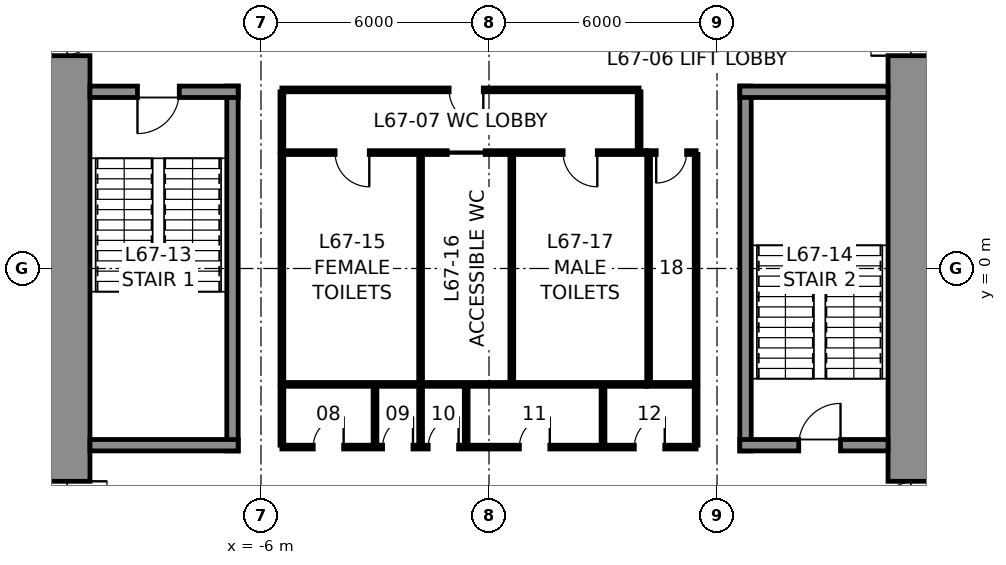
"""IFC4 building model, lengths in metres.
Left out: names, types, materials, properties, quantities, classifications, styles, units other than length and angle.
Written with IfcOpenShell. Run it as: python <this file> out.ifc"""

import sys

from ifc_helpers import new_model, si_unit, direction, frame, frame_2d, origin, place, context, subcontext, project, spatial, rectangle, extrude, element, fill, save


model = new_model("IFC4")
c1 = context("Model", 3, precision=1e-05, world=origin(), true_north=direction((0.0, 1.0)))
c2 = subcontext(c1, "Body", "Model", "MODEL_VIEW")
j1 = project(units=[si_unit("LENGTHUNIT", "METRE"), si_unit("PLANEANGLEUNIT", "RADIAN")], contexts=[c1])
p1 = place(None, origin())
s1 = spatial("IfcSite", under=j1, at=p1, CompositionType="ELEMENT")
p2 = place(p1, origin())
s2 = spatial("IfcBuilding", under=s1, at=p2, CompositionType="ELEMENT")
p3 = place(p2, frame((0.0, 0.0, 297.8)))
s3 = spatial("IfcBuildingStorey", under=s2, at=p3, CompositionType="ELEMENT", Elevation=297.8)
p4 = place(p3, frame((11.25, 10.5, 0.0), z_axis=(0.0, 0.0, 1.0), x_axis=(0.0, -1.0, 0.0)))
e1 = element("IfcWall", 1, at=p4, inside=s3, PredefinedType="SHEAR", context=c2, shape_type="SweptSolid", body=[
    extrude(rectangle(XDim=21.0, YDim=1.5, at=frame_2d((10.5, 0.0))), origin(), (0.0, 0.0, 1.0), 5.0),
])
p5 = place(p4, frame((3.7, 0.0, 0.0)))
e2 = element("IfcOpeningElement", 2, at=p5, cuts=e1, PredefinedType="OPENING", context=c2, shape_type="SweptSolid", body=[
    extrude(rectangle(XDim=1.2, YDim=2.3, at=frame_2d((0.6, 1.15))), frame((0.0, 0.76, 0.0), z_axis=(0.0, -1.0, 0.0), x_axis=(1.0, 0.0, 0.0)), (0.0, 0.0, 1.0), 1.52),
])
p6 = place(p4, frame((16.1, 0.0, 0.0)))
e3 = element("IfcOpeningElement", 3, at=p6, cuts=e1, PredefinedType="OPENING", context=c2, shape_type="SweptSolid", body=[
    extrude(rectangle(XDim=1.2, YDim=2.3, at=frame_2d((0.6, 1.15))), frame((0.0, 0.76, 0.0), z_axis=(0.0, -1.0, 0.0), x_axis=(1.0, 0.0, 0.0)), (0.0, 0.0, 1.0), 1.52),
])
p7 = place(p3, frame((-11.25, -10.5, 0.0), z_axis=(0.0, 0.0, 1.0), x_axis=(0.0, 1.0, 0.0)))
e4 = element("IfcWall", 4, at=p7, inside=s3, PredefinedType="SHEAR", context=c2, shape_type="SweptSolid", body=[
    extrude(rectangle(XDim=21.0, YDim=1.5, at=frame_2d((10.5, 0.0))), origin(), (0.0, 0.0, 1.0), 5.0),
])
p8 = place(p7, frame((16.1, 0.0, 0.0)))
e5 = element("IfcOpeningElement", 5, at=p8, cuts=e4, PredefinedType="OPENING", context=c2, shape_type="SweptSolid", body=[
    extrude(rectangle(XDim=1.2, YDim=2.3, at=frame_2d((0.6, 1.15))), frame((0.0, 0.76, 0.0), z_axis=(0.0, -1.0, 0.0), x_axis=(1.0, 0.0, 0.0)), (0.0, 0.0, 1.0), 1.52),
])
p9 = place(p7, frame((3.7, 0.0, 0.0)))
e6 = element("IfcOpeningElement", 6, at=p9, cuts=e4, PredefinedType="OPENING", context=c2, shape_type="SweptSolid", body=[
    extrude(rectangle(XDim=1.2, YDim=2.3, at=frame_2d((0.6, 1.15))), frame((0.0, 0.76, 0.0), z_axis=(0.0, -1.0, 0.0), x_axis=(1.0, 0.0, 0.0)), (0.0, 0.0, 1.0), 1.52),
])
p10 = place(p3, frame((-6.75, -4.8, 0.0), z_axis=(0.0, 0.0, 1.0), x_axis=(0.0, 1.0, 0.0)))
e7 = element("IfcWall", 7, at=p10, inside=s3, PredefinedType="SOLIDWALL", context=c2, shape_type="SweptSolid", body=[
    extrude(rectangle(XDim=9.6, YDim=0.3, at=frame_2d((4.8, 0.0))), origin(), (0.0, 0.0, 1.0), 4.75),
])
p11 = place(p3, frame((-10.5, 4.65, 0.0), z_axis=(0.0, 0.0, 1.0), x_axis=(1.0, 0.0, 0.0)))
e8 = element("IfcWall", 8, at=p11, inside=s3, PredefinedType="SOLIDWALL", context=c2, shape_type="SweptSolid", body=[
    extrude(rectangle(XDim=3.9, YDim=0.3, at=frame_2d((1.95, 0.0))), origin(), (0.0, 0.0, 1.0), 4.75),
])
p12 = place(p11, frame((1.25, 0.0, 0.0)))
e9 = element("IfcOpeningElement", 9, at=p12, cuts=e8, PredefinedType="OPENING", context=c2, shape_type="SweptSolid", body=[
    extrude(rectangle(XDim=1.1, YDim=2.3, at=frame_2d((0.55, 1.15))), frame((0.0, 0.16, 0.0), z_axis=(0.0, -1.0, 0.0), x_axis=(1.0, 0.0, 0.0)), (0.0, 0.0, 1.0), 0.32),
])
p13 = place(p3, frame((-6.6, -4.65, 0.0), z_axis=(0.0, 0.0, 1.0), x_axis=(-1.0, 0.0, 0.0)))
e10 = element("IfcWall", 10, at=p13, inside=s3, PredefinedType="SOLIDWALL", context=c2, shape_type="SweptSolid", body=[
    extrude(rectangle(XDim=3.9, YDim=0.3, at=frame_2d((1.95, 0.0))), origin(), (0.0, 0.0, 1.0), 4.75),
])
p14 = place(p3, frame((6.75, -4.8, 0.0), z_axis=(0.0, 0.0, 1.0), x_axis=(0.0, 1.0, 0.0)))
e11 = element("IfcWall", 11, at=p14, inside=s3, PredefinedType="SOLIDWALL", context=c2, shape_type="SweptSolid", body=[
    extrude(rectangle(XDim=9.6, YDim=0.3, at=frame_2d((4.8, 0.0))), origin(), (0.0, 0.0, 1.0), 4.75),
])
p15 = place(p3, frame((6.6, 4.65, 0.0), z_axis=(0.0, 0.0, 1.0), x_axis=(1.0, 0.0, 0.0)))
e12 = element("IfcWall", 12, at=p15, inside=s3, PredefinedType="SOLIDWALL", context=c2, shape_type="SweptSolid", body=[
    extrude(rectangle(XDim=3.9, YDim=0.3, at=frame_2d((1.95, 0.0))), origin(), (0.0, 0.0, 1.0), 4.75),
])
p16 = place(p3, frame((10.5, -4.65, 0.0), z_axis=(0.0, 0.0, 1.0), x_axis=(-1.0, 0.0, 0.0)))
e13 = element("IfcWall", 13, at=p16, inside=s3, PredefinedType="SOLIDWALL", context=c2, shape_type="SweptSolid", body=[
    extrude(rectangle(XDim=3.9, YDim=0.3, at=frame_2d((1.95, 0.0))), origin(), (0.0, 0.0, 1.0), 4.75),
])
p17 = place(p16, frame((1.25, 0.0, 0.0)))
e14 = element("IfcOpeningElement", 14, at=p17, cuts=e13, PredefinedType="OPENING", context=c2, shape_type="SweptSolid", body=[
    extrude(rectangle(XDim=1.1, YDim=2.3, at=frame_2d((0.55, 1.15))), frame((0.0, 0.16, 0.0), z_axis=(0.0, -1.0, 0.0), x_axis=(1.0, 0.0, 0.0)), (0.0, 0.0, 1.0), 0.32),
])
p18 = place(p3, frame((-5.45, 3.05, 0.0), z_axis=(0.0, 0.0, 1.0), x_axis=(1.0, 0.0, 0.0)))
e15 = element("IfcWall", 15, at=p18, inside=s3, PredefinedType="PARTITIONING", context=c2, shape_type="SweptSolid", body=[
    extrude(rectangle(XDim=9.6, YDim=0.1, at=frame_2d((4.8, 0.0))), origin(), (0.0, 0.0, 1.0), 4.75),
])
p19 = place(p18, frame((1.4, 0.0, 0.0)))
e16 = element("IfcOpeningElement", 16, at=p19, cuts=e15, PredefinedType="OPENING", context=c2, shape_type="SweptSolid", body=[
    extrude(rectangle(XDim=0.9, YDim=2.3, at=frame_2d((0.45, 1.15))), frame((0.0, 0.06, 0.0), z_axis=(0.0, -1.0, 0.0), x_axis=(1.0, 0.0, 0.0)), (0.0, 0.0, 1.0), 0.12),
])
p20 = place(p18, frame((4.35, 0.0, 0.0)))
e17 = element("IfcOpeningElement", 17, at=p20, cuts=e15, PredefinedType="OPENING", context=c2, shape_type="SweptSolid", body=[
    extrude(rectangle(XDim=1.0, YDim=2.3, at=frame_2d((0.5, 1.15))), frame((0.0, 0.06, 0.0), z_axis=(0.0, -1.0, 0.0), x_axis=(1.0, 0.0, 0.0)), (0.0, 0.0, 1.0), 0.12),
])
p21 = place(p18, frame((7.4, 0.0, 0.0)))
e18 = element("IfcOpeningElement", 18, at=p21, cuts=e15, PredefinedType="OPENING", context=c2, shape_type="SweptSolid", body=[
    extrude(rectangle(XDim=0.9, YDim=2.3, at=frame_2d((0.45, 1.15))), frame((0.0, 0.06, 0.0), z_axis=(0.0, -1.0, 0.0), x_axis=(1.0, 0.0, 0.0)), (0.0, 0.0, 1.0), 0.12),
])
p22 = place(p3, frame((4.15, 3.05, 0.0), z_axis=(0.0, 0.0, 1.0), x_axis=(1.0, 0.0, 0.0)))
e19 = element("IfcWall", 19, at=p22, inside=s3, PredefinedType="PARTITIONING", context=c2, shape_type="SweptSolid", body=[
    extrude(rectangle(XDim=1.3, YDim=0.1, at=frame_2d((0.65, 0.0))), origin(), (0.0, 0.0, 1.0), 4.75),
])
p23 = place(p22, frame((0.25, 0.0, 0.0)))
e20 = element("IfcOpeningElement", 20, at=p23, cuts=e19, PredefinedType="OPENING", context=c2, shape_type="SweptSolid", body=[
    extrude(rectangle(XDim=0.8, YDim=2.3, at=frame_2d((0.4, 1.15))), frame((0.0, 0.06, 0.0), z_axis=(0.0, -1.0, 0.0), x_axis=(1.0, 0.0, 0.0)), (0.0, 0.0, 1.0), 0.12),
])
p24 = place(p3, frame((4.15, -3.05, 0.0), z_axis=(0.0, 0.0, 1.0), x_axis=(-1.0, 0.0, 0.0)))
e21 = element("IfcWall", 21, at=p24, inside=s3, PredefinedType="PARTITIONING", context=c2, shape_type="SweptSolid", body=[
    extrude(rectangle(XDim=9.6, YDim=0.1, at=frame_2d((4.8, 0.0))), origin(), (0.0, 0.0, 1.0), 4.75),
])
p25 = place(p3, frame((5.45, -3.05, 0.0), z_axis=(0.0, 0.0, 1.0), x_axis=(-1.0, 0.0, 0.0)))
e22 = element("IfcWall", 22, at=p25, inside=s3, PredefinedType="PARTITIONING", context=c2, shape_type="SweptSolid", body=[
    extrude(rectangle(XDim=1.3, YDim=0.1, at=frame_2d((0.65, 0.0))), origin(), (0.0, 0.0, 1.0), 4.75),
])
for number, where, z_axis, x_axis in (
    (23, (5.45, 3.0, 0.0), (0.0, 0.0, 1.0), (0.0, -1.0, 0.0)),
    (24, (-5.45, -3.0, 0.0), (0.0, 0.0, 1.0), (0.0, 1.0, 0.0)),
    (25, (-1.8, -3.0, 0.0), (0.0, 0.0, 1.0), (0.0, 1.0, 0.0)),
    (26, (0.6, -3.0, 0.0), (0.0, 0.0, 1.0), (0.0, 1.0, 0.0)),
    (27, (4.2, -3.0, 0.0), (0.0, 0.0, 1.0), (0.0, 1.0, 0.0)),
):
    element("IfcWall", number, at=place(p3, frame(where, z_axis=z_axis, x_axis=x_axis)), inside=s3, PredefinedType="PARTITIONING", context=c2, shape_type="SweptSolid", body=[
        extrude(rectangle(XDim=6.0, YDim=0.1, at=frame_2d((3.0, 0.0))), origin(), (0.0, 0.0, 1.0), 4.75),
    ])
p26 = place(p3, frame((-5.45, 4.7, 0.0), z_axis=(0.0, 0.0, 1.0), x_axis=(1.0, 0.0, 0.0)))
e28 = element("IfcWall", 28, at=p26, inside=s3, PredefinedType="PARTITIONING", context=c2, shape_type="SweptSolid", body=[
    extrude(rectangle(XDim=9.4, YDim=0.1, at=frame_2d((4.7, 0.0))), origin(), (0.0, 0.0, 1.0), 4.75),
])
p27 = place(p26, frame((4.4, 0.0, 0.0)))
e29 = element("IfcOpeningElement", 29, at=p27, cuts=e28, PredefinedType="OPENING", context=c2, shape_type="SweptSolid", body=[
    extrude(rectangle(XDim=0.9, YDim=2.3, at=frame_2d((0.45, 1.15))), frame((0.0, 0.06, 0.0), z_axis=(0.0, -1.0, 0.0), x_axis=(1.0, 0.0, 0.0)), (0.0, 0.0, 1.0), 0.12),
])
for number, where, z_axis, x_axis in (
    (30, (-5.45, 3.1, 0.0), (0.0, 0.0, 1.0), (0.0, 1.0, 0.0)),
    (31, (3.95, 3.1, 0.0), (0.0, 0.0, 1.0), (0.0, 1.0, 0.0)),
):
    element("IfcWall", number, at=place(p3, frame(where, z_axis=z_axis, x_axis=x_axis)), inside=s3, PredefinedType="PARTITIONING", context=c2, shape_type="SweptSolid", body=[
        extrude(rectangle(XDim=1.55, YDim=0.1, at=frame_2d((0.775, 0.0))), origin(), (0.0, 0.0, 1.0), 4.75),
    ])
p28 = place(p3, frame((5.45, -4.7, 0.0), z_axis=(0.0, 0.0, 1.0), x_axis=(-1.0, 0.0, 0.0)))
e32 = element("IfcWall", 32, at=p28, inside=s3, PredefinedType="PARTITIONING", context=c2, shape_type="SweptSolid", body=[
    extrude(rectangle(XDim=10.9, YDim=0.1, at=frame_2d((5.45, 0.0))), origin(), (0.0, 0.0, 1.0), 4.75),
])
p29 = place(p28, frame((9.275, 0.0, 0.0)))
e33 = element("IfcOpeningElement", 33, at=p29, cuts=e32, PredefinedType="OPENING", context=c2, shape_type="SweptSolid", body=[
    extrude(rectangle(XDim=0.8, YDim=2.3, at=frame_2d((0.4, 1.15))), frame((0.0, 0.06, 0.0), z_axis=(0.0, -1.0, 0.0), x_axis=(1.0, 0.0, 0.0)), (0.0, 0.0, 1.0), 0.12),
])
p30 = place(p28, frame((7.45, 0.0, 0.0)))
e34 = element("IfcOpeningElement", 34, at=p30, cuts=e32, PredefinedType="OPENING", context=c2, shape_type="SweptSolid", body=[
    extrude(rectangle(XDim=0.8, YDim=2.3, at=frame_2d((0.4, 1.15))), frame((0.0, 0.06, 0.0), z_axis=(0.0, -1.0, 0.0), x_axis=(1.0, 0.0, 0.0)), (0.0, 0.0, 1.0), 0.12),
])
p31 = place(p28, frame((6.25, 0.0, 0.0)))
e35 = element("IfcOpeningElement", 35, at=p31, cuts=e32, PredefinedType="OPENING", context=c2, shape_type="SweptSolid", body=[
    extrude(rectangle(XDim=0.8, YDim=2.3, at=frame_2d((0.4, 1.15))), frame((0.0, 0.06, 0.0), z_axis=(0.0, -1.0, 0.0), x_axis=(1.0, 0.0, 0.0)), (0.0, 0.0, 1.0), 0.12),
])
p32 = place(p28, frame((3.85, 0.0, 0.0)))
e36 = element("IfcOpeningElement", 36, at=p32, cuts=e32, PredefinedType="OPENING", context=c2, shape_type="SweptSolid", body=[
    extrude(rectangle(XDim=0.8, YDim=2.3, at=frame_2d((0.4, 1.15))), frame((0.0, 0.06, 0.0), z_axis=(0.0, -1.0, 0.0), x_axis=(1.0, 0.0, 0.0)), (0.0, 0.0, 1.0), 0.12),
])
p33 = place(p28, frame((0.825, 0.0, 0.0)))
e37 = element("IfcOpeningElement", 37, at=p33, cuts=e32, PredefinedType="OPENING", context=c2, shape_type="SweptSolid", body=[
    extrude(rectangle(XDim=0.8, YDim=2.3, at=frame_2d((0.4, 1.15))), frame((0.0, 0.06, 0.0), z_axis=(0.0, -1.0, 0.0), x_axis=(1.0, 0.0, 0.0)), (0.0, 0.0, 1.0), 0.12),
])
for number, where, z_axis, x_axis in (
    (38, (-5.45, -3.1, 0.0), (0.0, 0.0, 1.0), (0.0, -1.0, 0.0)),
    (39, (5.45, -3.1, 0.0), (0.0, 0.0, 1.0), (0.0, -1.0, 0.0)),
    (40, (-3.0, -3.1, 0.0), (0.0, 0.0, 1.0), (0.0, -1.0, 0.0)),
    (41, (-1.8, -3.1, 0.0), (0.0, 0.0, 1.0), (0.0, -1.0, 0.0)),
    (42, (-0.6, -3.1, 0.0), (0.0, 0.0, 1.0), (0.0, -1.0, 0.0)),
    (43, (3.0, -3.1, 0.0), (0.0, 0.0, 1.0), (0.0, -1.0, 0.0)),
):
    element("IfcWall", number, at=place(p3, frame(where, z_axis=z_axis, x_axis=x_axis)), inside=s3, PredefinedType="PARTITIONING", context=c2, shape_type="SweptSolid", body=[
        extrude(rectangle(XDim=1.55, YDim=0.1, at=frame_2d((0.775, 0.0))), origin(), (0.0, 0.0, 1.0), 4.75),
    ])
p34 = place(p12, frame((1.1, 0.0, 0.0), z_axis=(0.0, 0.0, 1.0), x_axis=(-1.0, 0.0, 0.0)))
e44 = element("IfcDoor", 44, at=p34, inside=s3, OperationType="SINGLE_SWING_RIGHT", PredefinedType="DOOR", context=c2, shape_type="SweptSolid", body=[
    extrude(rectangle(XDim=1.1, YDim=2.3, at=frame_2d((0.55, 1.15))), frame((0.0, 0.025, 0.0), z_axis=(0.0, -1.0, 0.0), x_axis=(1.0, 0.0, 0.0)), (0.0, 0.0, 1.0), 0.05),
])
fill(e9, e44)
p35 = place(p17, frame((1.1, 0.0, 0.0), z_axis=(0.0, 0.0, 1.0), x_axis=(-1.0, 0.0, 0.0)))
e45 = element("IfcDoor", 45, at=p35, inside=s3, OperationType="SINGLE_SWING_RIGHT", PredefinedType="DOOR", context=c2, shape_type="SweptSolid", body=[
    extrude(rectangle(XDim=1.1, YDim=2.3, at=frame_2d((0.55, 1.15))), frame((0.0, 0.025, 0.0), z_axis=(0.0, -1.0, 0.0), x_axis=(1.0, 0.0, 0.0)), (0.0, 0.0, 1.0), 0.05),
])
fill(e14, e45)
p36 = place(p19, frame((0.9, 0.0, 0.0), z_axis=(0.0, 0.0, 1.0), x_axis=(-1.0, 0.0, 0.0)))
e46 = element("IfcDoor", 46, at=p36, inside=s3, OperationType="SINGLE_SWING_LEFT", PredefinedType="DOOR", context=c2, shape_type="SweptSolid", body=[
    extrude(rectangle(XDim=0.9, YDim=2.3, at=frame_2d((0.45, 1.15))), frame((0.0, 0.025, 0.0), z_axis=(0.0, -1.0, 0.0), x_axis=(1.0, 0.0, 0.0)), (0.0, 0.0, 1.0), 0.05),
])
fill(e16, e46)
p37 = place(p20, frame((1.0, 0.0, 0.0), z_axis=(0.0, 0.0, 1.0), x_axis=(-1.0, 0.0, 0.0)))
e47 = element("IfcDoor", 47, at=p37, inside=s3, OperationType="SLIDING_TO_LEFT", PredefinedType="DOOR", context=c2, shape_type="SweptSolid", body=[
    extrude(rectangle(XDim=1.0, YDim=2.3, at=frame_2d((0.5, 1.15))), frame((0.0, 0.025, 0.0), z_axis=(0.0, -1.0, 0.0), x_axis=(1.0, 0.0, 0.0)), (0.0, 0.0, 1.0), 0.05),
])
fill(e17, e47)
p38 = place(p21, frame((0.9, 0.0, 0.0), z_axis=(0.0, 0.0, 1.0), x_axis=(-1.0, 0.0, 0.0)))
e48 = element("IfcDoor", 48, at=p38, inside=s3, OperationType="SINGLE_SWING_LEFT", PredefinedType="DOOR", context=c2, shape_type="SweptSolid", body=[
    extrude(rectangle(XDim=0.9, YDim=2.3, at=frame_2d((0.45, 1.15))), frame((0.0, 0.025, 0.0), z_axis=(0.0, -1.0, 0.0), x_axis=(1.0, 0.0, 0.0)), (0.0, 0.0, 1.0), 0.05),
])
fill(e18, e48)
p39 = place(p23, frame((0.8, 0.0, 0.0), z_axis=(0.0, 0.0, 1.0), x_axis=(-1.0, 0.0, 0.0)))
e49 = element("IfcDoor", 49, at=p39, inside=s3, OperationType="SINGLE_SWING_RIGHT", PredefinedType="DOOR", context=c2, shape_type="SweptSolid", body=[
    extrude(rectangle(XDim=0.8, YDim=2.3, at=frame_2d((0.4, 1.15))), frame((0.0, 0.025, 0.0), z_axis=(0.0, -1.0, 0.0), x_axis=(1.0, 0.0, 0.0)), (0.0, 0.0, 1.0), 0.05),
])
fill(e20, e49)
p40 = place(p27, frame((0.9, 0.0, 0.0), z_axis=(0.0, 0.0, 1.0), x_axis=(-1.0, 0.0, 0.0)))
e50 = element("IfcDoor", 50, at=p40, inside=s3, OperationType="SINGLE_SWING_LEFT", PredefinedType="DOOR", context=c2, shape_type="SweptSolid", body=[
    extrude(rectangle(XDim=0.9, YDim=2.3, at=frame_2d((0.45, 1.15))), frame((0.0, 0.025, 0.0), z_axis=(0.0, -1.0, 0.0), x_axis=(1.0, 0.0, 0.0)), (0.0, 0.0, 1.0), 0.05),
])
fill(e29, e50)
p41 = place(p29, frame((0.8, 0.0, 0.0), z_axis=(0.0, 0.0, 1.0), x_axis=(-1.0, 0.0, 0.0)))
e51 = element("IfcDoor", 51, at=p41, inside=s3, OperationType="SINGLE_SWING_RIGHT", PredefinedType="DOOR", context=c2, shape_type="SweptSolid", body=[
    extrude(rectangle(XDim=0.8, YDim=2.3, at=frame_2d((0.4, 1.15))), frame((0.0, 0.025, 0.0), z_axis=(0.0, -1.0, 0.0), x_axis=(1.0, 0.0, 0.0)), (0.0, 0.0, 1.0), 0.05),
])
fill(e33, e51)
p42 = place(p30, frame((0.8, 0.0, 0.0), z_axis=(0.0, 0.0, 1.0), x_axis=(-1.0, 0.0, 0.0)))
e52 = element("IfcDoor", 52, at=p42, inside=s3, OperationType="SINGLE_SWING_RIGHT", PredefinedType="DOOR", context=c2, shape_type="SweptSolid", body=[
    extrude(rectangle(XDim=0.8, YDim=2.3, at=frame_2d((0.4, 1.15))), frame((0.0, 0.025, 0.0), z_axis=(0.0, -1.0, 0.0), x_axis=(1.0, 0.0, 0.0)), (0.0, 0.0, 1.0), 0.05),
])
fill(e34, e52)
p43 = place(p31, frame((0.8, 0.0, 0.0), z_axis=(0.0, 0.0, 1.0), x_axis=(-1.0, 0.0, 0.0)))
e53 = element("IfcDoor", 53, at=p43, inside=s3, OperationType="SINGLE_SWING_RIGHT", PredefinedType="DOOR", context=c2, shape_type="SweptSolid", body=[
    extrude(rectangle(XDim=0.8, YDim=2.3, at=frame_2d((0.4, 1.15))), frame((0.0, 0.025, 0.0), z_axis=(0.0, -1.0, 0.0), x_axis=(1.0, 0.0, 0.0)), (0.0, 0.0, 1.0), 0.05),
])
fill(e35, e53)
p44 = place(p32, frame((0.8, 0.0, 0.0), z_axis=(0.0, 0.0, 1.0), x_axis=(-1.0, 0.0, 0.0)))
e54 = element("IfcDoor", 54, at=p44, inside=s3, OperationType="SINGLE_SWING_RIGHT", PredefinedType="DOOR", context=c2, shape_type="SweptSolid", body=[
    extrude(rectangle(XDim=0.8, YDim=2.3, at=frame_2d((0.4, 1.15))), frame((0.0, 0.025, 0.0), z_axis=(0.0, -1.0, 0.0), x_axis=(1.0, 0.0, 0.0)), (0.0, 0.0, 1.0), 0.05),
])
fill(e36, e54)
p45 = place(p33, frame((0.8, 0.0, 0.0), z_axis=(0.0, 0.0, 1.0), x_axis=(-1.0, 0.0, 0.0)))
e55 = element("IfcDoor", 55, at=p45, inside=s3, OperationType="SINGLE_SWING_RIGHT", PredefinedType="DOOR", context=c2, shape_type="SweptSolid", body=[
    extrude(rectangle(XDim=0.8, YDim=2.3, at=frame_2d((0.4, 1.15))), frame((0.0, 0.025, 0.0), z_axis=(0.0, -1.0, 0.0), x_axis=(1.0, 0.0, 0.0)), (0.0, 0.0, 1.0), 0.05),
])
fill(e37, e55)
p46 = place(p8, frame((1.2, 0.0, 0.0), z_axis=(0.0, 0.0, 1.0), x_axis=(-1.0, 0.0, 0.0)))
e56 = element("IfcDoor", 56, at=p46, inside=s3, OperationType="SINGLE_SWING_LEFT", PredefinedType="DOOR", context=c2, shape_type="SweptSolid", body=[
    extrude(rectangle(XDim=1.2, YDim=2.3, at=frame_2d((0.6, 1.15))), frame((0.0, 0.025, 0.0), z_axis=(0.0, -1.0, 0.0), x_axis=(1.0, 0.0, 0.0)), (0.0, 0.0, 1.0), 0.05),
])
fill(e5, e56)
p47 = place(p9, frame((1.2, 0.0, 0.0), z_axis=(0.0, 0.0, 1.0), x_axis=(-1.0, 0.0, 0.0)))
e57 = element("IfcDoor", 57, at=p47, inside=s3, OperationType="SINGLE_SWING_LEFT", PredefinedType="DOOR", context=c2, shape_type="SweptSolid", body=[
    extrude(rectangle(XDim=1.2, YDim=2.3, at=frame_2d((0.6, 1.15))), frame((0.0, 0.025, 0.0), z_axis=(0.0, -1.0, 0.0), x_axis=(1.0, 0.0, 0.0)), (0.0, 0.0, 1.0), 0.05),
])
fill(e6, e57)
p48 = place(p5, frame((1.2, 0.0, 0.0), z_axis=(0.0, 0.0, 1.0), x_axis=(-1.0, 0.0, 0.0)))
e58 = element("IfcDoor", 58, at=p48, inside=s3, OperationType="SINGLE_SWING_LEFT", PredefinedType="DOOR", context=c2, shape_type="SweptSolid", body=[
    extrude(rectangle(XDim=1.2, YDim=2.3, at=frame_2d((0.6, 1.15))), frame((0.0, 0.025, 0.0), z_axis=(0.0, -1.0, 0.0), x_axis=(1.0, 0.0, 0.0)), (0.0, 0.0, 1.0), 0.05),
])
fill(e2, e58)
p49 = place(p6, frame((1.2, 0.0, 0.0), z_axis=(0.0, 0.0, 1.0), x_axis=(-1.0, 0.0, 0.0)))
e59 = element("IfcDoor", 59, at=p49, inside=s3, OperationType="SINGLE_SWING_LEFT", PredefinedType="DOOR", context=c2, shape_type="SweptSolid", body=[
    extrude(rectangle(XDim=1.2, YDim=2.3, at=frame_2d((0.6, 1.15))), frame((0.0, 0.025, 0.0), z_axis=(0.0, -1.0, 0.0), x_axis=(1.0, 0.0, 0.0)), (0.0, 0.0, 1.0), 0.05),
])
fill(e3, e59)
save(model, sys.argv[1])
